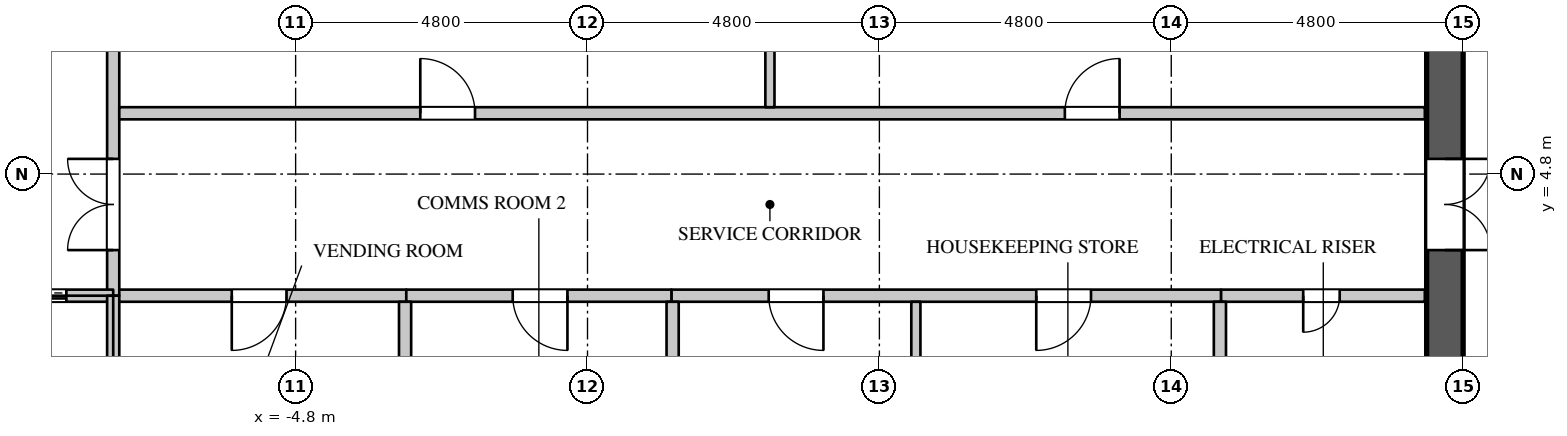
"""IFC4 building model, lengths in metres.
Left out: names, types, materials, properties, quantities, classifications, styles, units other than length and angle.
Written with IfcOpenShell. Run it as: python <this file> out.ifc"""

import sys

from ifc_helpers import new_model, si_unit, direction, frame, frame_2d, origin, place, context, subcontext, project, spatial, rectangle, extrude, element, fill, save


model = new_model("IFC4")
c1 = context("Model", 3, precision=1e-05, world=origin(), true_north=direction((0.0, 1.0)))
c2 = subcontext(c1, "Body", "Model", "MODEL_VIEW")
j1 = project(units=[si_unit("LENGTHUNIT", "METRE"), si_unit("PLANEANGLEUNIT", "RADIAN")], contexts=[c1])
p1 = place(None, origin())
s1 = spatial("IfcSite", under=j1, at=p1, CompositionType="ELEMENT")
p2 = place(p1, origin())
s2 = spatial("IfcBuilding", under=s1, at=p2, CompositionType="ELEMENT")
p3 = place(p2, frame((0.0, 0.0, 218.1)))
s3 = spatial("IfcBuildingStorey", under=s2, at=p3, CompositionType="ELEMENT", Elevation=218.1)
p4 = place(p3, frame((14.1, -11.4, 0.0), z_axis=(0.0, 0.0, 1.0), x_axis=(0.0, 1.0, 0.0)))
e1 = element("IfcWall", 1, at=p4, inside=s3, PredefinedType="SHEAR", context=c2, shape_type="SweptSolid", body=[
    extrude(rectangle(XDim=22.8, YDim=0.6, at=frame_2d((11.4, 0.0))), origin(), (0.0, 0.0, 1.0), 4.2),
])
p5 = place(p4, frame((20.45, 0.0, 0.0)))
e2 = element("IfcOpeningElement", 2, at=p5, cuts=e1, PredefinedType="OPENING", context=c2, shape_type="SweptSolid", body=[
    extrude(rectangle(XDim=1.1, YDim=2.2, at=frame_2d((0.55, 1.1))), frame((0.0, 0.31, 0.0), z_axis=(0.0, -1.0, 0.0), x_axis=(1.0, 0.0, 0.0)), (0.0, 0.0, 1.0), 0.62),
])
p6 = place(p4, frame((1.25, 0.0, 0.0)))
e3 = element("IfcOpeningElement", 3, at=p6, cuts=e1, PredefinedType="OPENING", context=c2, shape_type="SweptSolid", body=[
    extrude(rectangle(XDim=1.1, YDim=2.2, at=frame_2d((0.55, 1.1))), frame((0.0, 0.31, 0.0), z_axis=(0.0, -1.0, 0.0), x_axis=(1.0, 0.0, 0.0)), (0.0, 0.0, 1.0), 0.62),
])
p7 = place(p4, frame((14.95, 0.0, 0.0)))
e4 = element("IfcOpeningElement", 4, at=p7, cuts=e1, PredefinedType="OPENING", context=c2, shape_type="SweptSolid", body=[
    extrude(rectangle(XDim=1.5, YDim=2.4, at=frame_2d((0.75, 1.2))), frame((0.0, 0.31, 0.0), z_axis=(0.0, -1.0, 0.0), x_axis=(1.0, 0.0, 0.0)), (0.0, 0.0, 1.0), 0.62),
])
p8 = place(p4, frame((6.35, 0.0, 0.0)))
e5 = element("IfcOpeningElement", 5, at=p8, cuts=e1, PredefinedType="OPENING", context=c2, shape_type="SweptSolid", body=[
    extrude(rectangle(XDim=1.5, YDim=2.4, at=frame_2d((0.75, 1.2))), frame((0.0, 0.31, 0.0), z_axis=(0.0, -1.0, 0.0), x_axis=(1.0, 0.0, 0.0)), (0.0, 0.0, 1.0), 0.62),
])
p9 = place(p3, frame((-7.8, 2.8, 0.0), z_axis=(0.0, 0.0, 1.0), x_axis=(1.0, 0.0, 0.0)))
e6 = element("IfcWall", 6, at=p9, inside=s3, PredefinedType="PARTITIONING", context=c2, shape_type="SweptSolid", body=[
    extrude(rectangle(XDim=4.82, YDim=0.2, at=frame_2d((2.41, 0.0))), origin(), (0.0, 0.0, 1.0), 3.95),
])
p10 = place(p9, frame((1.95, 0.0, 0.0)))
e7 = element("IfcOpeningElement", 7, at=p10, cuts=e6, PredefinedType="OPENING", context=c2, shape_type="SweptSolid", body=[
    extrude(rectangle(XDim=0.9, YDim=2.2, at=frame_2d((0.45, 1.1))), frame((0.0, 0.11, 0.0), z_axis=(0.0, -1.0, 0.0), x_axis=(1.0, 0.0, 0.0)), (0.0, 0.0, 1.0), 0.22),
])
p11 = place(p3, frame((-7.8, 2.8, 0.0), z_axis=(0.0, 0.0, 1.0), x_axis=(0.0, 1.0, 0.0)))
e8 = element("IfcWall", 8, at=p11, inside=s3, PredefinedType="PARTITIONING", context=c2, shape_type="SweptSolid", body=[
    extrude(rectangle(XDim=5.275, YDim=0.2, at=frame_2d((2.637, 0.0))), origin(), (0.0, 0.0, 1.0), 3.95),
])
p12 = place(p11, frame((0.75, 0.0, 0.0)))
e9 = element("IfcOpeningElement", 9, at=p12, cuts=e8, PredefinedType="OPENING", context=c2, shape_type="SweptSolid", body=[
    extrude(rectangle(XDim=1.5, YDim=2.4, at=frame_2d((0.75, 1.2))), frame((0.0, 0.11, 0.0), z_axis=(0.0, -1.0, 0.0), x_axis=(1.0, 0.0, 0.0)), (0.0, 0.0, 1.0), 0.22),
])
p13 = place(p3, frame((-7.7, 5.8, 0.0), z_axis=(0.0, 0.0, 1.0), x_axis=(1.0, 0.0, 0.0)))
e10 = element("IfcWall", 10, at=p13, inside=s3, PredefinedType="PARTITIONING", context=c2, shape_type="SweptSolid", body=[
    extrude(rectangle(XDim=21.47, YDim=0.2, at=frame_2d((10.735, 0.0))), origin(), (0.0, 0.0, 1.0), 3.95),
])
p14 = place(p13, frame((4.95, 0.0, 0.0)))
e11 = element("IfcOpeningElement", 11, at=p14, cuts=e10, PredefinedType="OPENING", context=c2, shape_type="SweptSolid", body=[
    extrude(rectangle(XDim=0.9, YDim=2.2, at=frame_2d((0.45, 1.1))), frame((0.0, 0.11, 0.0), z_axis=(0.0, -1.0, 0.0), x_axis=(1.0, 0.0, 0.0)), (0.0, 0.0, 1.0), 0.22),
])
p15 = place(p13, frame((15.55, 0.0, 0.0)))
e12 = element("IfcOpeningElement", 12, at=p15, cuts=e10, PredefinedType="OPENING", context=c2, shape_type="SweptSolid", body=[
    extrude(rectangle(XDim=0.9, YDim=2.2, at=frame_2d((0.45, 1.1))), frame((0.0, 0.11, 0.0), z_axis=(0.0, -1.0, 0.0), x_axis=(1.0, 0.0, 0.0)), (0.0, 0.0, 1.0), 0.22),
])
p16 = place(p3, frame((1.38, 2.8, 0.0), z_axis=(0.0, 0.0, 1.0), x_axis=(1.0, 0.0, 0.0)))
e13 = element("IfcWall", 13, at=p16, inside=s3, PredefinedType="PARTITIONING", context=c2, shape_type="SweptSolid", body=[
    extrude(rectangle(XDim=9.04, YDim=0.2, at=frame_2d((4.52, 0.0))), origin(), (0.0, 0.0, 1.0), 3.95),
])
p17 = place(p16, frame((1.6, 0.0, 0.0)))
e14 = element("IfcOpeningElement", 14, at=p17, cuts=e13, PredefinedType="OPENING", context=c2, shape_type="SweptSolid", body=[
    extrude(rectangle(XDim=0.9, YDim=2.2, at=frame_2d((0.45, 1.1))), frame((0.0, 0.11, 0.0), z_axis=(0.0, -1.0, 0.0), x_axis=(1.0, 0.0, 0.0)), (0.0, 0.0, 1.0), 0.22),
])
p18 = place(p16, frame((6.0, 0.0, 0.0)))
e15 = element("IfcOpeningElement", 15, at=p18, cuts=e13, PredefinedType="OPENING", context=c2, shape_type="SweptSolid", body=[
    extrude(rectangle(XDim=0.9, YDim=2.2, at=frame_2d((0.45, 1.1))), frame((0.0, 0.11, 0.0), z_axis=(0.0, -1.0, 0.0), x_axis=(1.0, 0.0, 0.0)), (0.0, 0.0, 1.0), 0.22),
])
p19 = place(p3, frame((3.0, 5.9, 0.0), z_axis=(0.0, 0.0, 1.0), x_axis=(0.0, 1.0, 0.0)))
e16 = element("IfcWall", 16, at=p19, inside=s3, PredefinedType="PARTITIONING", context=c2, shape_type="SweptSolid", body=[
    extrude(rectangle(XDim=5.47, YDim=0.15, at=frame_2d((2.735, 0.0))), origin(), (0.0, 0.0, 1.0), 3.95),
])
p20 = place(p3, frame((5.4, 0.1, 0.0), z_axis=(0.0, 0.0, 1.0), x_axis=(0.0, 1.0, 0.0)))
e17 = element("IfcWall", 17, at=p20, inside=s3, PredefinedType="PARTITIONING", context=c2, shape_type="SweptSolid", body=[
    extrude(rectangle(XDim=2.6, YDim=0.15, at=frame_2d((1.3, 0.0))), origin(), (0.0, 0.0, 1.0), 3.95),
])
p21 = place(p3, frame((-2.98, 2.8, 0.0), z_axis=(0.0, 0.0, 1.0), x_axis=(1.0, 0.0, 0.0)))
e18 = element("IfcWall", 18, at=p21, inside=s3, PredefinedType="PARTITIONING", context=c2, shape_type="SweptSolid", body=[
    extrude(rectangle(XDim=4.36, YDim=0.2, at=frame_2d((2.18, 0.0))), origin(), (0.0, 0.0, 1.0), 3.95),
])
p22 = place(p21, frame((1.75, 0.0, 0.0)))
e19 = element("IfcOpeningElement", 19, at=p22, cuts=e18, PredefinedType="OPENING", context=c2, shape_type="SweptSolid", body=[
    extrude(rectangle(XDim=0.9, YDim=2.2, at=frame_2d((0.45, 1.1))), frame((0.0, 0.11, 0.0), z_axis=(0.0, -1.0, 0.0), x_axis=(1.0, 0.0, 0.0)), (0.0, 0.0, 1.0), 0.22),
])
for number, where, z_axis, x_axis in (
    (20, (-3.0, 0.1, 0.0), (0.0, 0.0, 1.0), (0.0, 1.0, 0.0)),
    (21, (1.4, 0.1, 0.0), (0.0, 0.0, 1.0), (0.0, 1.0, 0.0)),
):
    element("IfcWall", number, at=place(p3, frame(where, z_axis=z_axis, x_axis=x_axis)), inside=s3, PredefinedType="PARTITIONING", context=c2, shape_type="SweptSolid", body=[
        extrude(rectangle(XDim=2.6, YDim=0.2, at=frame_2d((1.3, 0.0))), origin(), (0.0, 0.0, 1.0), 3.95),
    ])
p23 = place(p3, frame((10.42, 2.8, 0.0), z_axis=(0.0, 0.0, 1.0), x_axis=(1.0, 0.0, 0.0)))
e22 = element("IfcWall", 22, at=p23, inside=s3, PredefinedType="PARTITIONING", context=c2, shape_type="SweptSolid", body=[
    extrude(rectangle(XDim=3.35, YDim=0.2, at=frame_2d((1.675, 0.0))), origin(), (0.0, 0.0, 1.0), 3.95),
])
p24 = place(p23, frame((1.35, 0.0, 0.0)))
e23 = element("IfcOpeningElement", 23, at=p24, cuts=e22, PredefinedType="OPENING", context=c2, shape_type="SweptSolid", body=[
    extrude(rectangle(XDim=0.6, YDim=2.0, at=frame_2d((0.3, 1.0))), frame((0.0, 0.11, 0.0), z_axis=(0.0, -1.0, 0.0), x_axis=(1.0, 0.0, 0.0)), (0.0, 0.0, 1.0), 0.22),
])
p25 = place(p3, frame((10.4, 0.1, 0.0), z_axis=(0.0, 0.0, 1.0), x_axis=(0.0, 1.0, 0.0)))
e24 = element("IfcWall", 24, at=p25, inside=s3, PredefinedType="PARTITIONING", context=c2, shape_type="SweptSolid", body=[
    extrude(rectangle(XDim=2.6, YDim=0.2, at=frame_2d((1.3, 0.0))), origin(), (0.0, 0.0, 1.0), 3.95),
])
p26 = place(p3, frame((-13.77, 2.8, 0.0), z_axis=(0.0, 0.0, 1.0), x_axis=(1.0, 0.0, 0.0)))
e25 = element("IfcWall", 25, at=p26, inside=s3, PredefinedType="PARTITIONING", context=c2, shape_type="SweptSolid", body=[
    extrude(rectangle(XDim=5.97, YDim=0.2, at=frame_2d((2.985, 0.0))), origin(), (0.0, 0.0, 1.0), 3.95),
])
p27 = place(p26, frame((1.1, 0.0, 0.0)))
e26 = element("IfcOpeningElement", 26, at=p27, cuts=e25, PredefinedType="OPENING", context=c2, shape_type="SweptSolid", body=[
    extrude(rectangle(XDim=1.1, YDim=2.2, at=frame_2d((0.55, 1.1))), frame((0.0, 0.11, 0.0), z_axis=(0.0, -1.0, 0.0), x_axis=(1.0, 0.0, 0.0)), (0.0, 0.0, 1.0), 0.22),
])
p28 = place(p26, frame((4.1, 0.0, 0.0)))
e27 = element("IfcOpeningElement", 27, at=p28, cuts=e25, PredefinedType="OPENING", context=c2, shape_type="SweptSolid", body=[
    extrude(rectangle(XDim=1.1, YDim=2.2, at=frame_2d((0.55, 1.1))), frame((0.0, 0.11, 0.0), z_axis=(0.0, -1.0, 0.0), x_axis=(1.0, 0.0, 0.0)), (0.0, 0.0, 1.0), 0.22),
])
p29 = place(p3, frame((-7.8, 0.0, 0.0), z_axis=(0.0, 0.0, 1.0), x_axis=(0.0, 1.0, 0.0)))
e28 = element("IfcWall", 28, at=p29, inside=s3, PredefinedType="PARTITIONING", context=c2, shape_type="SweptSolid", body=[
    extrude(rectangle(XDim=2.8, YDim=0.2, at=frame_2d((1.4, 0.0))), origin(), (0.0, 0.0, 1.0), 3.95),
])
p30 = place(p24, origin())
e29 = element("IfcDoor", 29, at=p30, inside=s3, OperationType="SINGLE_SWING_RIGHT", PredefinedType="DOOR", context=c2, shape_type="SweptSolid", body=[
    extrude(rectangle(XDim=0.6, YDim=2.0, at=frame_2d((0.3, 1.0))), frame((0.0, 0.025, 0.0), z_axis=(0.0, -1.0, 0.0), x_axis=(1.0, 0.0, 0.0)), (0.0, 0.0, 1.0), 0.05),
])
fill(e23, e29)
p31 = place(p14, origin())
e30 = element("IfcDoor", 30, at=p31, inside=s3, OperationType="SINGLE_SWING_LEFT", PredefinedType="DOOR", context=c2, shape_type="SweptSolid", body=[
    extrude(rectangle(XDim=0.9, YDim=2.2, at=frame_2d((0.45, 1.1))), frame((0.0, 0.025, 0.0), z_axis=(0.0, -1.0, 0.0), x_axis=(1.0, 0.0, 0.0)), (0.0, 0.0, 1.0), 0.05),
])
fill(e11, e30)
p32 = place(p15, origin())
e31 = element("IfcDoor", 31, at=p32, inside=s3, OperationType="SINGLE_SWING_RIGHT", PredefinedType="DOOR", context=c2, shape_type="SweptSolid", body=[
    extrude(rectangle(XDim=0.9, YDim=2.2, at=frame_2d((0.45, 1.1))), frame((0.0, 0.025, 0.0), z_axis=(0.0, -1.0, 0.0), x_axis=(1.0, 0.0, 0.0)), (0.0, 0.0, 1.0), 0.05),
])
fill(e12, e31)
p33 = place(p10, origin())
e32 = element("IfcDoor", 32, at=p33, inside=s3, OperationType="SINGLE_SWING_RIGHT", PredefinedType="DOOR", context=c2, shape_type="SweptSolid", body=[
    extrude(rectangle(XDim=0.9, YDim=2.2, at=frame_2d((0.45, 1.1))), frame((0.0, 0.025, 0.0), z_axis=(0.0, -1.0, 0.0), x_axis=(1.0, 0.0, 0.0)), (0.0, 0.0, 1.0), 0.05),
])
fill(e7, e32)
p34 = place(p22, origin())
e33 = element("IfcDoor", 33, at=p34, inside=s3, OperationType="SINGLE_SWING_LEFT", PredefinedType="DOOR", context=c2, shape_type="SweptSolid", body=[
    extrude(rectangle(XDim=0.9, YDim=2.2, at=frame_2d((0.45, 1.1))), frame((0.0, 0.025, 0.0), z_axis=(0.0, -1.0, 0.0), x_axis=(1.0, 0.0, 0.0)), (0.0, 0.0, 1.0), 0.05),
])
fill(e19, e33)
p35 = place(p17, origin())
e34 = element("IfcDoor", 34, at=p35, inside=s3, OperationType="SINGLE_SWING_LEFT", PredefinedType="DOOR", context=c2, shape_type="SweptSolid", body=[
    extrude(rectangle(XDim=0.9, YDim=2.2, at=frame_2d((0.45, 1.1))), frame((0.0, 0.025, 0.0), z_axis=(0.0, -1.0, 0.0), x_axis=(1.0, 0.0, 0.0)), (0.0, 0.0, 1.0), 0.05),
])
fill(e14, e34)
p36 = place(p18, origin())
e35 = element("IfcDoor", 35, at=p36, inside=s3, OperationType="SINGLE_SWING_RIGHT", PredefinedType="DOOR", context=c2, shape_type="SweptSolid", body=[
    extrude(rectangle(XDim=0.9, YDim=2.2, at=frame_2d((0.45, 1.1))), frame((0.0, 0.025, 0.0), z_axis=(0.0, -1.0, 0.0), x_axis=(1.0, 0.0, 0.0)), (0.0, 0.0, 1.0), 0.05),
])
fill(e15, e35)
p37 = place(p28, origin())
e36 = element("IfcDoor", 36, at=p37, inside=s3, OperationType="DOUBLE_DOOR_SLIDING", PredefinedType="DOOR", context=c2, shape_type="SweptSolid", body=[
    extrude(rectangle(XDim=1.1, YDim=2.2, at=frame_2d((0.55, 1.1))), frame((0.0, 0.025, 0.0), z_axis=(0.0, -1.0, 0.0), x_axis=(1.0, 0.0, 0.0)), (0.0, 0.0, 1.0), 0.05),
])
fill(e27, e36)
p38 = place(p12, origin())
e37 = element("IfcDoor", 37, at=p38, inside=s3, OperationType="DOUBLE_DOOR_SINGLE_SWING", PredefinedType="DOOR", context=c2, shape_type="SweptSolid", body=[
    extrude(rectangle(XDim=1.5, YDim=2.4, at=frame_2d((0.75, 1.2))), frame((0.0, 0.025, 0.0), z_axis=(0.0, -1.0, 0.0), x_axis=(1.0, 0.0, 0.0)), (0.0, 0.0, 1.0), 0.05),
])
fill(e9, e37)
p39 = place(p7, origin())
e38 = element("IfcDoor", 38, at=p39, inside=s3, OperationType="DOUBLE_DOOR_SINGLE_SWING", PredefinedType="DOOR", context=c2, shape_type="SweptSolid", body=[
    extrude(rectangle(XDim=1.5, YDim=2.4, at=frame_2d((0.75, 1.2))), frame((0.0, -0.245, 0.0), z_axis=(0.0, -1.0, 0.0), x_axis=(1.0, 0.0, 0.0)), (0.0, 0.0, 1.0), 0.05),
])
fill(e4, e38)
save(model, sys.argv[1])
